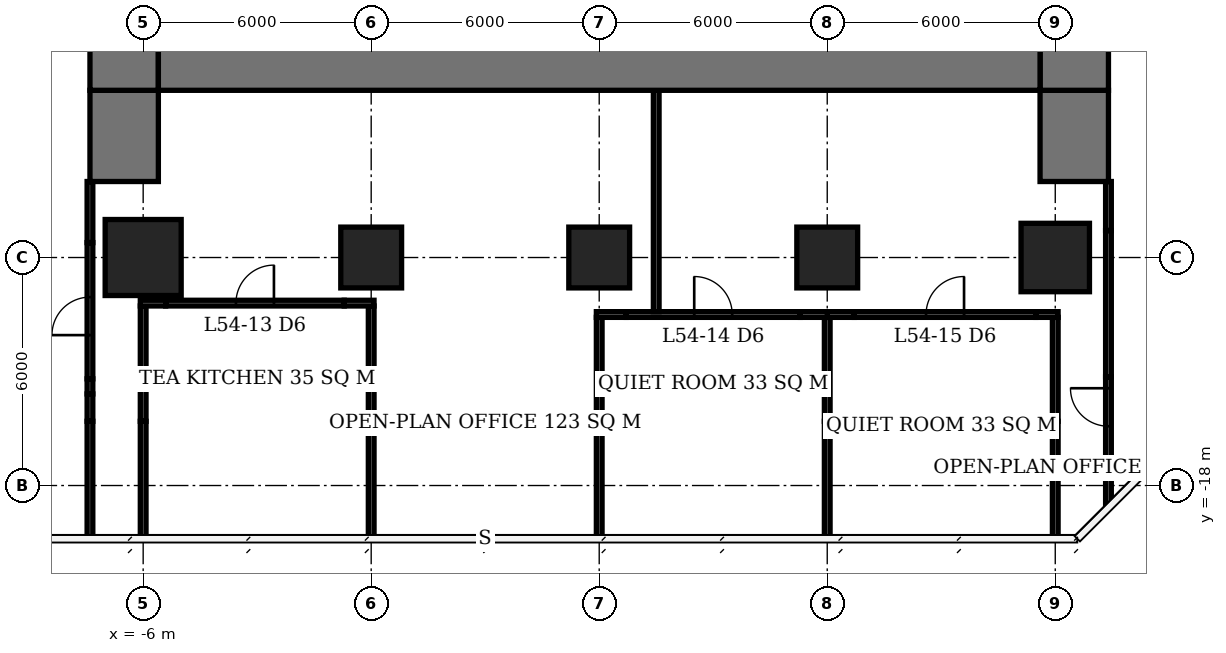
"""IFC4 building model, lengths in metres.
Left out: names, types, materials, properties, quantities, classifications, styles, units other than length and angle.
Written with IfcOpenShell. Run it as: python <this file> out.ifc"""

import sys

from ifc_helpers import new_model, si_unit, direction, frame, frame_2d, origin, origin_2d, place, context, subcontext, project, spatial, rectangle, extrude, element, fill, save


model = new_model("IFC4")
c1 = context("Model", 3, precision=1e-05, world=origin(), true_north=direction((0.0, 1.0)))
c2 = subcontext(c1, "Body", "Model", "MODEL_VIEW")
j1 = project(units=[si_unit("LENGTHUNIT", "METRE"), si_unit("PLANEANGLEUNIT", "RADIAN")], contexts=[c1])
p1 = place(None, origin())
s1 = spatial("IfcSite", under=j1, at=p1, CompositionType="ELEMENT")
p2 = place(p1, origin())
s2 = spatial("IfcBuilding", under=s1, at=p2, CompositionType="ELEMENT")
p3 = place(p2, frame((0.0, 0.0, 220.1)))
s3 = spatial("IfcBuildingStorey", under=s2, at=p3, CompositionType="ELEMENT", Elevation=220.1)
p4 = place(p3, frame((-6.0, -12.0, 0.0), z_axis=(0.0, 0.0, 1.0), x_axis=(1.0, 0.0, 0.0)))
e1 = element("IfcColumn", 1, at=p4, inside=s3, PredefinedType="COLUMN", context=c2, shape_type="SweptSolid", body=[
    extrude(rectangle(XDim=2.0, YDim=2.0, at=origin_2d()), origin(), (0.0, 0.0, 1.0), 3.9),
])
for number, where, z_axis, x_axis in (
    (2, (0.0, -12.0, 0.0), (0.0, 0.0, 1.0), (1.0, 0.0, 0.0)),
    (3, (6.0, -12.0, 0.0), (0.0, 0.0, 1.0), (1.0, 0.0, 0.0)),
    (4, (12.0, -12.0, 0.0), (0.0, 0.0, 1.0), (1.0, 0.0, 0.0)),
):
    element("IfcColumn", number, at=place(p3, frame(where, z_axis=z_axis, x_axis=x_axis)), inside=s3, PredefinedType="COLUMN", context=c2, shape_type="SweptSolid", body=[
        extrude(rectangle(XDim=1.6, YDim=1.6, at=origin_2d()), origin(), (0.0, 0.0, 1.0), 3.9),
    ])
p5 = place(p3, frame((18.0, -12.0, 0.0), z_axis=(0.0, 0.0, 1.0), x_axis=(1.0, 0.0, 0.0)))
e5 = element("IfcColumn", 5, at=p5, inside=s3, PredefinedType="COLUMN", context=c2, shape_type="SweptSolid", body=[
    extrude(rectangle(XDim=1.8, YDim=1.8, at=origin_2d()), origin(), (0.0, 0.0, 1.0), 3.9),
])
p6 = place(p3, frame((-5.6, -6.6, 0.0), z_axis=(0.0, 0.0, 1.0), x_axis=(1.0, 0.0, 0.0)))
e6 = element("IfcWall", 6, at=p6, inside=s3, PredefinedType="SHEAR", context=c2, shape_type="SweptSolid", body=[
    extrude(rectangle(XDim=23.2, YDim=2.0, at=frame_2d((11.6, 0.0))), origin(), (0.0, 0.0, 1.0), 3.9),
])
p7 = place(p3, frame((-6.5, -7.6, 0.0), z_axis=(0.0, 0.0, 1.0), x_axis=(0.0, 1.0, 0.0)))
e7 = element("IfcWall", 7, at=p7, inside=s3, PredefinedType="SHEAR", context=c2, shape_type="SweptSolid", body=[
    extrude(rectangle(XDim=21.2, YDim=1.8, at=frame_2d((10.6, 0.0))), origin(), (0.0, 0.0, 1.0), 3.9),
])
p8 = place(p7, frame((7.8, 0.0, 0.0)))
e8 = element("IfcOpeningElement", 8, at=p8, cuts=e7, PredefinedType="OPENING", context=c2, shape_type="SweptSolid", body=[
    extrude(rectangle(XDim=1.8, YDim=2.4, at=frame_2d((0.9, 1.2))), frame((0.0, 0.91, 0.0), z_axis=(0.0, -1.0, 0.0), x_axis=(1.0, 0.0, 0.0)), (0.0, 0.0, 1.0), 1.82),
])
p9 = place(p3, frame((18.5, -7.6, 0.0), z_axis=(0.0, 0.0, 1.0), x_axis=(0.0, 1.0, 0.0)))
e9 = element("IfcWall", 9, at=p9, inside=s3, PredefinedType="SHEAR", context=c2, shape_type="SweptSolid", body=[
    extrude(rectangle(XDim=21.2, YDim=1.8, at=frame_2d((10.6, 0.0))), origin(), (0.0, 0.0, 1.0), 3.9),
])
p10 = place(p9, frame((9.2, 0.0, 0.0)))
e10 = element("IfcOpeningElement", 10, at=p10, cuts=e9, PredefinedType="OPENING", context=c2, shape_type="SweptSolid", body=[
    extrude(rectangle(XDim=1.8, YDim=2.4, at=frame_2d((0.9, 1.2))), frame((0.0, 0.91, 0.0), z_axis=(0.0, -1.0, 0.0), x_axis=(1.0, 0.0, 0.0)), (0.0, 0.0, 1.0), 1.82),
])
for number, where, z_axis, x_axis in (
    (11, (-6.5, -10.0, 0.0), (0.0, 0.0, 1.0), (0.0, 1.0, 0.0)),
    (12, (18.5, -10.0, 0.0), (0.0, 0.0, 1.0), (0.0, 1.0, 0.0)),
):
    element("IfcWall", number, at=place(p3, frame(where, z_axis=z_axis, x_axis=x_axis)), inside=s3, PredefinedType="SHEAR", context=c2, shape_type="SweptSolid", body=[
        extrude(rectangle(XDim=2.4, YDim=1.8, at=frame_2d((1.2, 0.0))), origin(), (0.0, 0.0, 1.0), 3.9),
    ])
p11 = place(p3, frame((5.925, -13.5, 0.0), z_axis=(0.0, 0.0, 1.0), x_axis=(1.0, 0.0, 0.0)))
e13 = element("IfcWall", 13, at=p11, inside=s3, PredefinedType="PARTITIONING", context=c2, shape_type="SweptSolid", body=[
    extrude(rectangle(XDim=0.785, YDim=0.15, at=frame_2d((0.393, 0.0))), origin(), (0.0, 0.0, 1.0), 2.65),
])
p12 = place(p3, frame((6.71, -13.5, 0.0), z_axis=(0.0, 0.0, 1.0), x_axis=(1.0, 0.0, 0.0)))
e14 = element("IfcWall", 14, at=p12, inside=s3, PredefinedType="PARTITIONING", context=c2, shape_type="SweptSolid", body=[
    extrude(rectangle(XDim=4.58, YDim=0.15, at=frame_2d((2.29, 0.0))), origin(), (0.0, 0.0, 1.0), 3.65),
])
p13 = place(p12, frame((1.79, 0.0, 0.0)))
e15 = element("IfcOpeningElement", 15, at=p13, cuts=e14, PredefinedType="OPENING", context=c2, shape_type="SweptSolid", body=[
    extrude(rectangle(XDim=1.0, YDim=2.1, at=frame_2d((0.5, 1.05))), frame((0.0, 0.085, 0.0), z_axis=(0.0, -1.0, 0.0), x_axis=(1.0, 0.0, 0.0)), (0.0, 0.0, 1.0), 0.17),
])
p14 = place(p3, frame((11.29, -13.5, 0.0), z_axis=(0.0, 0.0, 1.0), x_axis=(1.0, 0.0, 0.0)))
e16 = element("IfcWall", 16, at=p14, inside=s3, PredefinedType="PARTITIONING", context=c2, shape_type="SweptSolid", body=[
    extrude(rectangle(XDim=0.785, YDim=0.15, at=frame_2d((0.393, 0.0))), origin(), (0.0, 0.0, 1.0), 2.65),
])
p15 = place(p3, frame((12.0, -13.5, 0.0), z_axis=(0.0, 0.0, 1.0), x_axis=(1.0, 0.0, 0.0)))
e17 = element("IfcWall", 17, at=p15, inside=s3, PredefinedType="PARTITIONING", context=c2, shape_type="SweptSolid", body=[
    extrude(rectangle(XDim=0.71, YDim=0.15, at=frame_2d((0.355, 0.0))), origin(), (0.0, 0.0, 1.0), 2.65),
])
p16 = place(p3, frame((12.71, -13.5, 0.0), z_axis=(0.0, 0.0, 1.0), x_axis=(1.0, 0.0, 0.0)))
e18 = element("IfcWall", 18, at=p16, inside=s3, PredefinedType="PARTITIONING", context=c2, shape_type="SweptSolid", body=[
    extrude(rectangle(XDim=4.78, YDim=0.15, at=frame_2d((2.39, 0.0))), origin(), (0.0, 0.0, 1.0), 3.65),
])
p17 = place(p16, frame((1.89, 0.0, 0.0)))
e19 = element("IfcOpeningElement", 19, at=p17, cuts=e18, PredefinedType="OPENING", context=c2, shape_type="SweptSolid", body=[
    extrude(rectangle(XDim=1.0, YDim=2.1, at=frame_2d((0.5, 1.05))), frame((0.0, 0.085, 0.0), z_axis=(0.0, -1.0, 0.0), x_axis=(1.0, 0.0, 0.0)), (0.0, 0.0, 1.0), 0.17),
])
p18 = place(p3, frame((17.49, -13.5, 0.0), z_axis=(0.0, 0.0, 1.0), x_axis=(1.0, 0.0, 0.0)))
e20 = element("IfcWall", 20, at=p18, inside=s3, PredefinedType="PARTITIONING", context=c2, shape_type="SweptSolid", body=[
    extrude(rectangle(XDim=0.585, YDim=0.15, at=frame_2d((0.292, 0.0))), origin(), (0.0, 0.0, 1.0), 2.65),
])
p19 = place(p3, frame((-6.075, -13.2, 0.0), z_axis=(0.0, 0.0, 1.0), x_axis=(1.0, 0.0, 0.0)))
e21 = element("IfcWall", 21, at=p19, inside=s3, PredefinedType="PARTITIONING", context=c2, shape_type="SweptSolid", body=[
    extrude(rectangle(XDim=0.667, YDim=0.15, at=frame_2d((0.333, 0.0))), origin(), (0.0, 0.0, 1.0), 2.65),
])
p20 = place(p3, frame((-5.408, -13.2, 0.0), z_axis=(0.0, 0.0, 1.0), x_axis=(1.0, 0.0, 0.0)))
e22 = element("IfcWall", 22, at=p20, inside=s3, PredefinedType="PARTITIONING", context=c2, shape_type="SweptSolid", body=[
    extrude(rectangle(XDim=4.698, YDim=0.15, at=frame_2d((2.349, 0.0))), origin(), (0.0, 0.0, 1.0), 3.65),
])
p21 = place(p20, frame((1.849, 0.0, 0.0)))
e23 = element("IfcOpeningElement", 23, at=p21, cuts=e22, PredefinedType="OPENING", context=c2, shape_type="SweptSolid", body=[
    extrude(rectangle(XDim=1.0, YDim=2.1, at=frame_2d((0.5, 1.05))), frame((0.0, 0.085, 0.0), z_axis=(0.0, -1.0, 0.0), x_axis=(1.0, 0.0, 0.0)), (0.0, 0.0, 1.0), 0.17),
])
p22 = place(p3, frame((-0.71, -13.2, 0.0), z_axis=(0.0, 0.0, 1.0), x_axis=(1.0, 0.0, 0.0)))
e24 = element("IfcWall", 24, at=p22, inside=s3, PredefinedType="PARTITIONING", context=c2, shape_type="SweptSolid", body=[
    extrude(rectangle(XDim=0.785, YDim=0.15, at=frame_2d((0.393, 0.0))), origin(), (0.0, 0.0, 1.0), 2.65),
])
p23 = place(p3, frame((-6.0, -19.4, 0.0), z_axis=(0.0, 0.0, 1.0), x_axis=(0.0, 1.0, 0.0)))
e25 = element("IfcWall", 25, at=p23, inside=s3, PredefinedType="PARTITIONING", context=c2, shape_type="SweptSolid", body=[
    extrude(rectangle(XDim=3.09, YDim=0.15, at=frame_2d((1.545, 0.0))), origin(), (0.0, 0.0, 1.0), 3.65),
])
p24 = place(p3, frame((-6.0, -16.31, 0.0), z_axis=(0.0, 0.0, 1.0), x_axis=(0.0, 1.0, 0.0)))
e26 = element("IfcWall", 26, at=p24, inside=s3, PredefinedType="PARTITIONING", context=c2, shape_type="SweptSolid", body=[
    extrude(rectangle(XDim=3.035, YDim=0.15, at=frame_2d((1.518, 0.0))), origin(), (0.0, 0.0, 1.0), 2.65),
])
p25 = place(p3, frame((0.0, -19.35, 0.0), z_axis=(0.0, 0.0, 1.0), x_axis=(0.0, 1.0, 0.0)))
e27 = element("IfcWall", 27, at=p25, inside=s3, PredefinedType="PARTITIONING", context=c2, shape_type="SweptSolid", body=[
    extrude(rectangle(XDim=3.04, YDim=0.15, at=frame_2d((1.52, 0.0))), origin(), (0.0, 0.0, 1.0), 3.65),
])
p26 = place(p3, frame((0.0, -16.31, 0.0), z_axis=(0.0, 0.0, 1.0), x_axis=(0.0, 1.0, 0.0)))
e28 = element("IfcWall", 28, at=p26, inside=s3, PredefinedType="PARTITIONING", context=c2, shape_type="SweptSolid", body=[
    extrude(rectangle(XDim=3.035, YDim=0.15, at=frame_2d((1.518, 0.0))), origin(), (0.0, 0.0, 1.0), 2.65),
])
p27 = place(p3, frame((6.0, -19.35, 0.0), z_axis=(0.0, 0.0, 1.0), x_axis=(0.0, 1.0, 0.0)))
e29 = element("IfcWall", 29, at=p27, inside=s3, PredefinedType="PARTITIONING", context=c2, shape_type="SweptSolid", body=[
    extrude(rectangle(XDim=3.04, YDim=0.15, at=frame_2d((1.52, 0.0))), origin(), (0.0, 0.0, 1.0), 3.65),
])
p28 = place(p3, frame((6.0, -16.31, 0.0), z_axis=(0.0, 0.0, 1.0), x_axis=(0.0, 1.0, 0.0)))
e30 = element("IfcWall", 30, at=p28, inside=s3, PredefinedType="PARTITIONING", context=c2, shape_type="SweptSolid", body=[
    extrude(rectangle(XDim=2.735, YDim=0.15, at=frame_2d((1.368, 0.0))), origin(), (0.0, 0.0, 1.0), 2.65),
])
p29 = place(p3, frame((12.0, -19.4, 0.0), z_axis=(0.0, 0.0, 1.0), x_axis=(0.0, 1.0, 0.0)))
e31 = element("IfcWall", 31, at=p29, inside=s3, PredefinedType="PARTITIONING", context=c2, shape_type="SweptSolid", body=[
    extrude(rectangle(XDim=3.09, YDim=0.15, at=frame_2d((1.545, 0.0))), origin(), (0.0, 0.0, 1.0), 3.65),
])
p30 = place(p3, frame((12.0, -16.31, 0.0), z_axis=(0.0, 0.0, 1.0), x_axis=(0.0, 1.0, 0.0)))
e32 = element("IfcWall", 32, at=p30, inside=s3, PredefinedType="PARTITIONING", context=c2, shape_type="SweptSolid", body=[
    extrude(rectangle(XDim=2.735, YDim=0.15, at=frame_2d((1.368, 0.0))), origin(), (0.0, 0.0, 1.0), 2.65),
])
p31 = place(p3, frame((18.0, -19.4, 0.0), z_axis=(0.0, 0.0, 1.0), x_axis=(0.0, 1.0, 0.0)))
e33 = element("IfcWall", 33, at=p31, inside=s3, PredefinedType="PARTITIONING", context=c2, shape_type="SweptSolid", body=[
    extrude(rectangle(XDim=3.09, YDim=0.15, at=frame_2d((1.545, 0.0))), origin(), (0.0, 0.0, 1.0), 3.65),
])
p32 = place(p3, frame((18.0, -16.31, 0.0), z_axis=(0.0, 0.0, 1.0), x_axis=(0.0, 1.0, 0.0)))
e34 = element("IfcWall", 34, at=p32, inside=s3, PredefinedType="PARTITIONING", context=c2, shape_type="SweptSolid", body=[
    extrude(rectangle(XDim=2.735, YDim=0.15, at=frame_2d((1.368, 0.0))), origin(), (0.0, 0.0, 1.0), 2.65),
])
p33 = place(p3, frame((-7.4, -19.4, 0.0), z_axis=(0.0, 0.0, 1.0), x_axis=(0.0, 1.0, 0.0)))
e35 = element("IfcWall", 35, at=p33, inside=s3, PredefinedType="PARTITIONING", context=c2, shape_type="SweptSolid", body=[
    extrude(rectangle(XDim=3.09, YDim=0.15, at=frame_2d((1.545, 0.0))), origin(), (0.0, 0.0, 1.0), 3.65),
])
p34 = place(p3, frame((-7.4, -16.31, 0.0), z_axis=(0.0, 0.0, 1.0), x_axis=(0.0, 1.0, 0.0)))
e36 = element("IfcWall", 36, at=p34, inside=s3, PredefinedType="PARTITIONING", context=c2, shape_type="SweptSolid", body=[
    extrude(rectangle(XDim=0.72, YDim=0.15, at=frame_2d((0.36, 0.0))), origin(), (0.0, 0.0, 1.0), 2.65),
])
p35 = place(p3, frame((-7.4, -15.59, 0.0), z_axis=(0.0, 0.0, 1.0), x_axis=(0.0, 1.0, 0.0)))
e37 = element("IfcWall", 37, at=p35, inside=s3, PredefinedType="PARTITIONING", context=c2, shape_type="SweptSolid", body=[
    extrude(rectangle(XDim=0.398, YDim=0.15, at=frame_2d((0.199, 0.0))), origin(), (0.0, 0.0, 1.0), 3.65),
])
p36 = place(p3, frame((-7.4, -15.192, 0.0), z_axis=(0.0, 0.0, 1.0), x_axis=(0.0, 1.0, 0.0)))
e38 = element("IfcWall", 38, at=p36, inside=s3, PredefinedType="PARTITIONING", context=c2, shape_type="SweptSolid", body=[
    extrude(rectangle(XDim=3.584, YDim=0.15, at=frame_2d((1.792, 0.0))), origin(), (0.0, 0.0, 1.0), 2.65),
])
p37 = place(p36, frame((1.15, 0.0, 0.0)))
e39 = element("IfcOpeningElement", 39, at=p37, cuts=e38, PredefinedType="OPENING", context=c2, shape_type="SweptSolid", body=[
    extrude(rectangle(XDim=1.0, YDim=2.1, at=frame_2d((0.5, 1.05))), frame((0.0, 0.085, 0.0), z_axis=(0.0, -1.0, 0.0), x_axis=(1.0, 0.0, 0.0)), (0.0, 0.0, 1.0), 0.17),
])
p38 = place(p3, frame((-7.4, -11.608, 0.0), z_axis=(0.0, 0.0, 1.0), x_axis=(0.0, 1.0, 0.0)))
e40 = element("IfcWall", 40, at=p38, inside=s3, PredefinedType="PARTITIONING", context=c2, shape_type="SweptSolid", body=[
    extrude(rectangle(XDim=1.608, YDim=0.15, at=frame_2d((0.804, 0.0))), origin(), (0.0, 0.0, 1.0), 3.65),
])
p39 = place(p3, frame((7.5, -13.425, 0.0), z_axis=(0.0, 0.0, 1.0), x_axis=(0.0, 1.0, 0.0)))
e41 = element("IfcWall", 41, at=p39, inside=s3, PredefinedType="PARTITIONING", context=c2, shape_type="SweptSolid", body=[
    extrude(rectangle(XDim=5.825, YDim=0.15, at=frame_2d((2.913, 0.0))), origin(), (0.0, 0.0, 1.0), 3.65),
])
p40 = place(p3, frame((19.4, -18.489, 0.0), z_axis=(0.0, 0.0, 1.0), x_axis=(0.0, 1.0, 0.0)))
e42 = element("IfcWall", 42, at=p40, inside=s3, PredefinedType="PARTITIONING", context=c2, shape_type="SweptSolid", body=[
    extrude(rectangle(XDim=3.349, YDim=0.15, at=frame_2d((1.675, 0.0))), origin(), (0.0, 0.0, 1.0), 3.65),
])
p41 = place(p40, frame((2.049, 0.0, 0.0)))
e43 = element("IfcOpeningElement", 43, at=p41, cuts=e42, PredefinedType="OPENING", context=c2, shape_type="SweptSolid", body=[
    extrude(rectangle(XDim=1.0, YDim=2.1, at=frame_2d((0.5, 1.05))), frame((0.0, 0.085, 0.0), z_axis=(0.0, -1.0, 0.0), x_axis=(1.0, 0.0, 0.0)), (0.0, 0.0, 1.0), 0.17),
])
p42 = place(p3, frame((19.4, -15.14, 0.0), z_axis=(0.0, 0.0, 1.0), x_axis=(0.0, 1.0, 0.0)))
e44 = element("IfcWall", 44, at=p42, inside=s3, PredefinedType="PARTITIONING", context=c2, shape_type="SweptSolid", body=[
    extrude(rectangle(XDim=3.85, YDim=0.15, at=frame_2d((1.925, 0.0))), origin(), (0.0, 0.0, 1.0), 2.65),
])
p43 = place(p3, frame((19.4, -11.29, 0.0), z_axis=(0.0, 0.0, 1.0), x_axis=(0.0, 1.0, 0.0)))
e45 = element("IfcWall", 45, at=p43, inside=s3, PredefinedType="PARTITIONING", context=c2, shape_type="SweptSolid", body=[
    extrude(rectangle(XDim=1.29, YDim=0.15, at=frame_2d((0.645, 0.0))), origin(), (0.0, 0.0, 1.0), 3.65),
])
p44 = place(p21, origin())
e46 = element("IfcDoor", 46, at=p44, inside=s3, OperationType="SINGLE_SWING_RIGHT", PredefinedType="DOOR", context=c2, shape_type="SweptSolid", body=[
    extrude(rectangle(XDim=1.0, YDim=2.1, at=frame_2d((0.5, 1.05))), frame((0.0, 0.025, 0.0), z_axis=(0.0, -1.0, 0.0), x_axis=(1.0, 0.0, 0.0)), (0.0, 0.0, 1.0), 0.05),
])
fill(e23, e46)
p45 = place(p13, origin())
e47 = element("IfcDoor", 47, at=p45, inside=s3, OperationType="SINGLE_SWING_LEFT", PredefinedType="DOOR", context=c2, shape_type="SweptSolid", body=[
    extrude(rectangle(XDim=1.0, YDim=2.1, at=frame_2d((0.5, 1.05))), frame((0.0, 0.025, 0.0), z_axis=(0.0, -1.0, 0.0), x_axis=(1.0, 0.0, 0.0)), (0.0, 0.0, 1.0), 0.05),
])
fill(e15, e47)
p46 = place(p17, origin())
e48 = element("IfcDoor", 48, at=p46, inside=s3, OperationType="SINGLE_SWING_RIGHT", PredefinedType="DOOR", context=c2, shape_type="SweptSolid", body=[
    extrude(rectangle(XDim=1.0, YDim=2.1, at=frame_2d((0.5, 1.05))), frame((0.0, 0.025, 0.0), z_axis=(0.0, -1.0, 0.0), x_axis=(1.0, 0.0, 0.0)), (0.0, 0.0, 1.0), 0.05),
])
fill(e19, e48)
p47 = place(p37, origin())
e49 = element("IfcDoor", 49, at=p47, inside=s3, OperationType="SINGLE_SWING_LEFT", PredefinedType="DOOR", context=c2, shape_type="SweptSolid", body=[
    extrude(rectangle(XDim=1.0, YDim=2.1, at=frame_2d((0.5, 1.05))), frame((0.0, 0.025, 0.0), z_axis=(0.0, -1.0, 0.0), x_axis=(1.0, 0.0, 0.0)), (0.0, 0.0, 1.0), 0.05),
])
fill(e39, e49)
p48 = place(p41, origin())
e50 = element("IfcDoor", 50, at=p48, inside=s3, OperationType="SINGLE_SWING_RIGHT", PredefinedType="DOOR", context=c2, shape_type="SweptSolid", body=[
    extrude(rectangle(XDim=1.0, YDim=2.1, at=frame_2d((0.5, 1.05))), frame((0.0, 0.025, 0.0), z_axis=(0.0, -1.0, 0.0), x_axis=(1.0, 0.0, 0.0)), (0.0, 0.0, 1.0), 0.05),
])
fill(e43, e50)
save(model, sys.argv[1])
